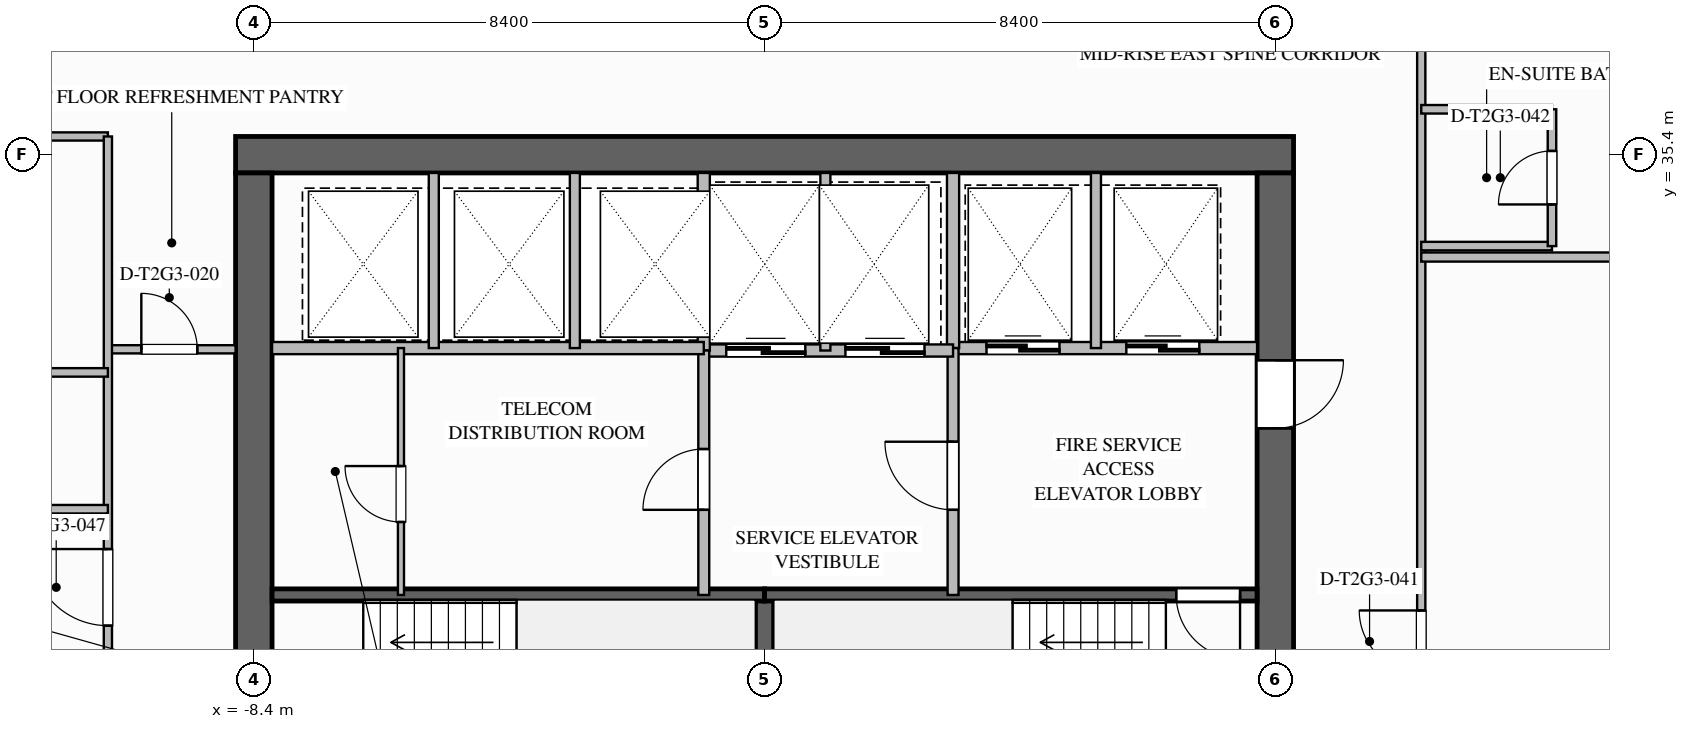
"""IFC4 building model, lengths in metres.
Left out: names, types, materials, properties, quantities, classifications, styles, units other than length and angle.
Written with IfcOpenShell. Run it as: python <this file> out.ifc"""

import sys

from ifc_helpers import new_model, si_unit, direction, frame, frame_2d, origin, place, context, subcontext, project, spatial, rectangle, extrude, element, fill, save


model = new_model("IFC4")
c1 = context("Model", 3, precision=1e-05, world=origin(), true_north=direction((0.0, 1.0)))
c2 = subcontext(c1, "Body", "Model", "MODEL_VIEW")
j1 = project(units=[si_unit("LENGTHUNIT", "METRE"), si_unit("PLANEANGLEUNIT", "RADIAN")], contexts=[c1])
p1 = place(None, origin())
s1 = spatial("IfcSite", under=j1, at=p1, CompositionType="ELEMENT")
p2 = place(p1, origin())
s2 = spatial("IfcBuilding", under=s1, at=p2, CompositionType="ELEMENT")
p3 = place(p2, frame((0.0, 0.0, 119.8)))
s3 = spatial("IfcBuildingStorey", under=s2, at=p3, CompositionType="ELEMENT", Elevation=119.8)
p4 = place(p3, frame((-8.7, 35.4, 0.0), z_axis=(0.0, 0.0, 1.0), x_axis=(1.0, 0.0, 0.0)))
e1 = element("IfcWall", 1, at=p4, inside=s3, PredefinedType="SHEAR", context=c2, shape_type="SweptSolid", body=[
    extrude(rectangle(XDim=17.4, YDim=0.6, at=frame_2d((8.7, 0.0))), origin(), (0.0, 0.0, 1.0), 3.5),
])
p5 = place(p3, frame((8.4, 35.1, 0.0), z_axis=(0.0, 0.0, 1.0), x_axis=(0.0, -1.0, 0.0)))
e2 = element("IfcWall", 2, at=p5, inside=s3, PredefinedType="SHEAR", context=c2, shape_type="SweptSolid", body=[
    extrude(rectangle(XDim=16.2, YDim=0.6, at=frame_2d((8.1, 0.0))), origin(), (0.0, 0.0, 1.0), 3.5),
])
p6 = place(p5, frame((3.08, 0.0, 0.0)))
e3 = element("IfcOpeningElement", 3, at=p6, cuts=e2, PredefinedType="OPENING", context=c2, shape_type="SweptSolid", body=[
    extrude(rectangle(XDim=1.12, YDim=2.1, at=frame_2d((0.56, 1.05))), frame((0.0, 0.31, 0.0), z_axis=(0.0, -1.0, 0.0), x_axis=(1.0, 0.0, 0.0)), (0.0, 0.0, 1.0), 0.62),
])
p7 = place(p5, frame((10.62, 0.0, 0.0)))
e4 = element("IfcOpeningElement", 4, at=p7, cuts=e2, PredefinedType="OPENING", context=c2, shape_type="SweptSolid", body=[
    extrude(rectangle(XDim=1.08, YDim=2.04, at=frame_2d((0.54, 1.02))), frame((0.0, 0.31, 0.0), z_axis=(0.0, -1.0, 0.0), x_axis=(1.0, 0.0, 0.0)), (0.0, 0.0, 1.0), 0.62),
])
p8 = place(p3, frame((-8.4, 18.9, 0.0), z_axis=(0.0, 0.0, 1.0), x_axis=(0.0, 1.0, 0.0)))
e5 = element("IfcWall", 5, at=p8, inside=s3, PredefinedType="SHEAR", context=c2, shape_type="SweptSolid", body=[
    extrude(rectangle(XDim=16.2, YDim=0.6, at=frame_2d((8.1, 0.0))), origin(), (0.0, 0.0, 1.0), 3.5),
])
p9 = place(p8, frame((4.5, 0.0, 0.0)))
e6 = element("IfcOpeningElement", 6, at=p9, cuts=e5, PredefinedType="OPENING", context=c2, shape_type="SweptSolid", body=[
    extrude(rectangle(XDim=1.08, YDim=2.04, at=frame_2d((0.54, 1.02))), frame((0.0, 0.31, 0.0), z_axis=(0.0, -1.0, 0.0), x_axis=(1.0, 0.0, 0.0)), (0.0, 0.0, 1.0), 0.62),
])
p10 = place(p3, frame((0.0, 25.04, 0.0), z_axis=(0.0, 0.0, 1.0), x_axis=(0.0, 1.0, 0.0)))
e7 = element("IfcWall", 7, at=p10, inside=s3, PredefinedType="SOLIDWALL", context=c2, shape_type="SweptSolid", body=[
    extrude(rectangle(XDim=3.12, YDim=0.3, at=frame_2d((1.56, 0.0))), origin(), (0.0, 0.0, 1.0), 3.24),
])
p11 = place(p3, frame((-8.1, 28.16, 0.0), z_axis=(0.0, 0.0, 1.0), x_axis=(1.0, 0.0, 0.0)))
e8 = element("IfcWall", 8, at=p11, inside=s3, PredefinedType="SOLIDWALL", context=c2, shape_type="SweptSolid", body=[
    extrude(rectangle(XDim=8.1, YDim=0.2, at=frame_2d((4.05, 0.0))), origin(), (0.0, 0.0, 1.0), 3.24),
])
p12 = place(p3, frame((8.1, 28.16, 0.0), z_axis=(0.0, 0.0, 1.0), x_axis=(-1.0, 0.0, 0.0)))
e9 = element("IfcWall", 9, at=p12, inside=s3, PredefinedType="SOLIDWALL", context=c2, shape_type="SweptSolid", body=[
    extrude(rectangle(XDim=8.1, YDim=0.2, at=frame_2d((4.05, 0.0))), origin(), (0.0, 0.0, 1.0), 3.24),
])
p13 = place(p12, frame((0.28, 0.0, 0.0)))
e10 = element("IfcOpeningElement", 10, at=p13, cuts=e9, PredefinedType="OPENING", context=c2, shape_type="SweptSolid", body=[
    extrude(rectangle(XDim=1.05, YDim=2.1, at=frame_2d((0.525, 1.05))), frame((0.0, 0.11, 0.0), z_axis=(0.0, -1.0, 0.0), x_axis=(1.0, 0.0, 0.0)), (0.0, 0.0, 1.0), 0.22),
])
p14 = place(p3, frame((3.1, 32.22, 0.0), z_axis=(0.0, 0.0, 1.0), x_axis=(1.0, 0.0, 0.0)))
e11 = element("IfcWall", 11, at=p14, inside=s3, PredefinedType="SOLIDWALL", context=c2, shape_type="SweptSolid", body=[
    extrude(rectangle(XDim=5.0, YDim=0.2, at=frame_2d((2.5, 0.0))), origin(), (0.0, 0.0, 1.0), 3.24),
])
p15 = place(p14, frame((0.55, 0.0, 0.0)))
e12 = element("IfcOpeningElement", 12, at=p15, cuts=e11, PredefinedType="OPENING", context=c2, shape_type="SweptSolid", body=[
    extrude(rectangle(XDim=1.2, YDim=2.2, at=frame_2d((0.6, 1.1))), frame((0.0, 0.11, 0.0), z_axis=(0.0, -1.0, 0.0), x_axis=(1.0, 0.0, 0.0)), (0.0, 0.0, 1.0), 0.22),
])
p16 = place(p14, frame((2.85, 0.0, 0.0)))
e13 = element("IfcOpeningElement", 13, at=p16, cuts=e11, PredefinedType="OPENING", context=c2, shape_type="SweptSolid", body=[
    extrude(rectangle(XDim=1.2, YDim=2.2, at=frame_2d((0.6, 1.1))), frame((0.0, 0.11, 0.0), z_axis=(0.0, -1.0, 0.0), x_axis=(1.0, 0.0, 0.0)), (0.0, 0.0, 1.0), 0.22),
])
p17 = place(p3, frame((3.1, 32.22, 0.0), z_axis=(0.0, 0.0, 1.0), x_axis=(0.0, 1.0, 0.0)))
e14 = element("IfcWall", 14, at=p17, inside=s3, PredefinedType="SOLIDWALL", context=c2, shape_type="SweptSolid", body=[
    extrude(rectangle(XDim=2.88, YDim=0.2, at=frame_2d((1.44, 0.0))), origin(), (0.0, 0.0, 1.0), 3.24),
])
p18 = place(p3, frame((5.45, 32.22, 0.0), z_axis=(0.0, 0.0, 1.0), x_axis=(0.0, 1.0, 0.0)))
e15 = element("IfcWall", 15, at=p18, inside=s3, PredefinedType="PARTITIONING", context=c2, shape_type="SweptSolid", body=[
    extrude(rectangle(XDim=2.88, YDim=0.165, at=frame_2d((1.44, 0.0))), origin(), (0.0, 0.0, 1.0), 3.24),
])
p19 = place(p3, frame((3.1, 28.16, 0.0), z_axis=(0.0, 0.0, 1.0), x_axis=(0.0, 1.0, 0.0)))
e16 = element("IfcWall", 16, at=p19, inside=s3, PredefinedType="SOLIDWALL", context=c2, shape_type="SweptSolid", body=[
    extrude(rectangle(XDim=4.06, YDim=0.18, at=frame_2d((2.03, 0.0))), origin(), (0.0, 0.0, 1.0), 3.24),
])
p20 = place(p19, frame((1.4, 0.0, 0.0)))
e17 = element("IfcOpeningElement", 17, at=p20, cuts=e16, PredefinedType="OPENING", context=c2, shape_type="SweptSolid", body=[
    extrude(rectangle(XDim=1.12, YDim=2.1, at=frame_2d((0.56, 1.05))), frame((0.0, 0.1, 0.0), z_axis=(0.0, -1.0, 0.0), x_axis=(1.0, 0.0, 0.0)), (0.0, 0.0, 1.0), 0.2),
])
p21 = place(p3, frame((-1.0, 32.18, 0.0), z_axis=(0.0, 0.0, 1.0), x_axis=(1.0, 0.0, 0.0)))
e18 = element("IfcWall", 18, at=p21, inside=s3, PredefinedType="SOLIDWALL", context=c2, shape_type="SweptSolid", body=[
    extrude(rectangle(XDim=4.1, YDim=0.2, at=frame_2d((2.05, 0.0))), origin(), (0.0, 0.0, 1.0), 3.24),
])
p22 = place(p21, frame((0.37, 0.0, 0.0)))
e19 = element("IfcOpeningElement", 19, at=p22, cuts=e18, PredefinedType="OPENING", context=c2, shape_type="SweptSolid", body=[
    extrude(rectangle(XDim=1.3, YDim=2.2, at=frame_2d((0.65, 1.1))), frame((0.0, 0.11, 0.0), z_axis=(0.0, -1.0, 0.0), x_axis=(1.0, 0.0, 0.0)), (0.0, 0.0, 1.0), 0.22),
])
p23 = place(p21, frame((2.33, 0.0, 0.0)))
e20 = element("IfcOpeningElement", 20, at=p23, cuts=e18, PredefinedType="OPENING", context=c2, shape_type="SweptSolid", body=[
    extrude(rectangle(XDim=1.3, YDim=2.2, at=frame_2d((0.65, 1.1))), frame((0.0, 0.11, 0.0), z_axis=(0.0, -1.0, 0.0), x_axis=(1.0, 0.0, 0.0)), (0.0, 0.0, 1.0), 0.22),
])
p24 = place(p3, frame((-1.0, 32.18, 0.0), z_axis=(0.0, 0.0, 1.0), x_axis=(0.0, 1.0, 0.0)))
e21 = element("IfcWall", 21, at=p24, inside=s3, PredefinedType="SOLIDWALL", context=c2, shape_type="SweptSolid", body=[
    extrude(rectangle(XDim=2.92, YDim=0.2, at=frame_2d((1.46, 0.0))), origin(), (0.0, 0.0, 1.0), 3.24),
])
p25 = place(p3, frame((1.0, 32.18, 0.0), z_axis=(0.0, 0.0, 1.0), x_axis=(0.0, 1.0, 0.0)))
e22 = element("IfcWall", 22, at=p25, inside=s3, PredefinedType="PARTITIONING", context=c2, shape_type="SweptSolid", body=[
    extrude(rectangle(XDim=2.92, YDim=0.165, at=frame_2d((1.46, 0.0))), origin(), (0.0, 0.0, 1.0), 3.24),
])
p26 = place(p3, frame((-1.0, 28.16, 0.0), z_axis=(0.0, 0.0, 1.0), x_axis=(0.0, 1.0, 0.0)))
e23 = element("IfcWall", 23, at=p26, inside=s3, PredefinedType="SOLIDWALL", context=c2, shape_type="SweptSolid", body=[
    extrude(rectangle(XDim=4.02, YDim=0.18, at=frame_2d((2.01, 0.0))), origin(), (0.0, 0.0, 1.0), 3.24),
])
p27 = place(p26, frame((1.4, 0.0, 0.0)))
e24 = element("IfcOpeningElement", 24, at=p27, cuts=e23, PredefinedType="OPENING", context=c2, shape_type="SweptSolid", body=[
    extrude(rectangle(XDim=1.0, YDim=2.1, at=frame_2d((0.5, 1.05))), frame((0.0, 0.1, 0.0), z_axis=(0.0, -1.0, 0.0), x_axis=(1.0, 0.0, 0.0)), (0.0, 0.0, 1.0), 0.2),
])
p28 = place(p3, frame((-8.1, 32.22, 0.0), z_axis=(0.0, 0.0, 1.0), x_axis=(1.0, 0.0, 0.0)))
e25 = element("IfcWall", 25, at=p28, inside=s3, PredefinedType="SOLIDWALL", context=c2, shape_type="SweptSolid", body=[
    extrude(rectangle(XDim=7.1, YDim=0.2, at=frame_2d((3.55, 0.0))), origin(), (0.0, 0.0, 1.0), 3.24),
])
for number, where, z_axis, x_axis in (
    (26, (-5.44, 32.22, 0.0), (0.0, 0.0, 1.0), (0.0, 1.0, 0.0)),
    (27, (-3.12, 32.22, 0.0), (0.0, 0.0, 1.0), (0.0, 1.0, 0.0)),
):
    element("IfcWall", number, at=place(p3, frame(where, z_axis=z_axis, x_axis=x_axis)), inside=s3, PredefinedType="PARTITIONING", context=c2, shape_type="SweptSolid", body=[
        extrude(rectangle(XDim=2.88, YDim=0.165, at=frame_2d((1.44, 0.0))), origin(), (0.0, 0.0, 1.0), 3.24),
    ])
p29 = place(p3, frame((-5.98, 28.16, 0.0), z_axis=(0.0, 0.0, 1.0), x_axis=(0.0, 1.0, 0.0)))
e28 = element("IfcWall", 28, at=p29, inside=s3, PredefinedType="PARTITIONING", context=c2, shape_type="SweptSolid", body=[
    extrude(rectangle(XDim=4.06, YDim=0.1, at=frame_2d((2.03, 0.0))), origin(), (0.0, 0.0, 1.0), 3.24),
])
p30 = place(p29, frame((1.2, 0.0, 0.0)))
e29 = element("IfcOpeningElement", 29, at=p30, cuts=e28, PredefinedType="OPENING", context=c2, shape_type="SweptSolid", body=[
    extrude(rectangle(XDim=0.92, YDim=2.1, at=frame_2d((0.46, 1.05))), frame((0.0, 0.06, 0.0), z_axis=(0.0, -1.0, 0.0), x_axis=(1.0, 0.0, 0.0)), (0.0, 0.0, 1.0), 0.12),
])
p31 = place(p3, frame((-10.8, 32.2, 0.0), z_axis=(0.0, 0.0, 1.0), x_axis=(1.0, 0.0, 0.0)))
e30 = element("IfcWall", 30, at=p31, inside=s3, PredefinedType="PARTITIONING", context=c2, shape_type="SweptSolid", body=[
    extrude(rectangle(XDim=2.1, YDim=0.135, at=frame_2d((1.05, 0.0))), origin(), (0.0, 0.0, 1.0), 3.24),
])
p32 = place(p31, frame((0.55, 0.0, 0.0)))
e31 = element("IfcOpeningElement", 31, at=p32, cuts=e30, PredefinedType="OPENING", context=c2, shape_type="SweptSolid", body=[
    extrude(rectangle(XDim=0.92, YDim=2.1, at=frame_2d((0.46, 1.05))), frame((0.0, 0.077, 0.0), z_axis=(0.0, -1.0, 0.0), x_axis=(1.0, 0.0, 0.0)), (0.0, 0.0, 1.0), 0.155),
])
p33 = place(p3, frame((-16.2, 35.7, 0.0), z_axis=(0.0, 0.0, 1.0), x_axis=(1.0, 0.0, 0.0)))
e32 = element("IfcWall", 32, at=p33, inside=s3, PredefinedType="PARTITIONING", context=c2, shape_type="SweptSolid", body=[
    extrude(rectangle(XDim=5.4, YDim=0.135, at=frame_2d((2.7, 0.0))), origin(), (0.0, 0.0, 1.0), 3.24),
])
p34 = place(p3, frame((-10.8, 18.3, 0.0), z_axis=(0.0, 0.0, 1.0), x_axis=(0.0, 1.0, 0.0)))
e33 = element("IfcWall", 33, at=p34, inside=s3, PredefinedType="PARTITIONING", context=c2, shape_type="SweptSolid", body=[
    extrude(rectangle(XDim=17.4, YDim=0.135, at=frame_2d((8.7, 0.0))), origin(), (0.0, 0.0, 1.0), 3.24),
])
p35 = place(p34, frame((6.785, 0.0, 0.0)))
e34 = element("IfcOpeningElement", 34, at=p35, cuts=e33, PredefinedType="OPENING", context=c2, shape_type="SweptSolid", body=[
    extrude(rectangle(XDim=1.26, YDim=2.2, at=frame_2d((0.63, 1.1))), frame((0.0, 0.077, 0.0), z_axis=(0.0, -1.0, 0.0), x_axis=(1.0, 0.0, 0.0)), (0.0, 0.0, 1.0), 0.155),
])
p36 = place(p34, frame((9.355, 0.0, 0.0)))
e35 = element("IfcOpeningElement", 35, at=p36, cuts=e33, PredefinedType="OPENING", context=c2, shape_type="SweptSolid", body=[
    extrude(rectangle(XDim=1.26, YDim=2.2, at=frame_2d((0.63, 1.1))), frame((0.0, 0.077, 0.0), z_axis=(0.0, -1.0, 0.0), x_axis=(1.0, 0.0, 0.0)), (0.0, 0.0, 1.0), 0.155),
])
p37 = place(p3, frame((10.8, 10.8, 0.0), z_axis=(0.0, 0.0, 1.0), x_axis=(0.0, 1.0, 0.0)))
e36 = element("IfcWall", 36, at=p37, inside=s3, PredefinedType="PARTITIONING", context=c2, shape_type="SweptSolid", body=[
    extrude(rectangle(XDim=32.4, YDim=0.135, at=frame_2d((16.2, 0.0))), origin(), (0.0, 0.0, 1.0), 3.24),
])
p38 = place(p37, frame((5.722, 0.0, 0.0)))
e37 = element("IfcOpeningElement", 37, at=p38, cuts=e36, PredefinedType="OPENING", context=c2, shape_type="SweptSolid", body=[
    extrude(rectangle(XDim=1.26, YDim=2.2, at=frame_2d((0.63, 1.1))), frame((0.0, 0.077, 0.0), z_axis=(0.0, -1.0, 0.0), x_axis=(1.0, 0.0, 0.0)), (0.0, 0.0, 1.0), 0.155),
])
p39 = place(p37, frame((16.085, 0.0, 0.0)))
e38 = element("IfcOpeningElement", 38, at=p39, cuts=e36, PredefinedType="OPENING", context=c2, shape_type="SweptSolid", body=[
    extrude(rectangle(XDim=1.02, YDim=2.15, at=frame_2d((0.51, 1.075))), frame((0.0, 0.077, 0.0), z_axis=(0.0, -1.0, 0.0), x_axis=(1.0, 0.0, 0.0)), (0.0, 0.0, 1.0), 0.155),
])
p40 = place(p37, frame((28.244, 0.0, 0.0)))
e39 = element("IfcOpeningElement", 39, at=p40, cuts=e36, PredefinedType="OPENING", context=c2, shape_type="SweptSolid", body=[
    extrude(rectangle(XDim=1.26, YDim=2.2, at=frame_2d((0.63, 1.1))), frame((0.0, 0.077, 0.0), z_axis=(0.0, -1.0, 0.0), x_axis=(1.0, 0.0, 0.0)), (0.0, 0.0, 1.0), 0.155),
])
p41 = place(p3, frame((10.8, 33.717, 0.0), z_axis=(0.0, 0.0, 1.0), x_axis=(1.0, 0.0, 0.0)))
e40 = element("IfcWall", 40, at=p41, inside=s3, PredefinedType="PARTITIONING", context=c2, shape_type="SweptSolid", body=[
    extrude(rectangle(XDim=11.28, YDim=0.15, at=frame_2d((5.64, 0.0))), origin(), (0.0, 0.0, 1.0), 3.24),
])
for number, where, z_axis, x_axis in (
    (41, (10.8, 33.897, 0.0), (0.0, 0.0, 1.0), (1.0, 0.0, 0.0)),
    (42, (10.8, 36.147, 0.0), (0.0, 0.0, 1.0), (1.0, 0.0, 0.0)),
):
    element("IfcWall", number, at=place(p3, frame(where, z_axis=z_axis, x_axis=x_axis)), inside=s3, PredefinedType="PLUMBINGWALL", context=c2, shape_type="SweptSolid", body=[
        extrude(rectangle(XDim=2.15, YDim=0.14, at=frame_2d((1.075, 0.0))), origin(), (0.0, 0.0, 1.0), 3.24),
    ])
p42 = place(p3, frame((12.95, 33.897, 0.0), z_axis=(0.0, 0.0, 1.0), x_axis=(0.0, 1.0, 0.0)))
e43 = element("IfcWall", 43, at=p42, inside=s3, PredefinedType="PLUMBINGWALL", context=c2, shape_type="SweptSolid", body=[
    extrude(rectangle(XDim=2.25, YDim=0.14, at=frame_2d((1.125, 0.0))), origin(), (0.0, 0.0, 1.0), 3.24),
])
p43 = place(p42, frame((0.685, 0.0, 0.0)))
e44 = element("IfcOpeningElement", 44, at=p43, cuts=e43, PredefinedType="OPENING", context=c2, shape_type="SweptSolid", body=[
    extrude(rectangle(XDim=0.88, YDim=2.1, at=frame_2d((0.44, 1.05))), frame((0.0, 0.08, 0.0), z_axis=(0.0, -1.0, 0.0), x_axis=(1.0, 0.0, 0.0)), (0.0, 0.0, 1.0), 0.16),
])
for number, where, z_axis, x_axis in (
    (45, (-10.8, 29.57, 0.0), (0.0, 0.0, 1.0), (-1.0, 0.0, 0.0)),
    (46, (-10.8, 31.82, 0.0), (0.0, 0.0, 1.0), (-1.0, 0.0, 0.0)),
):
    element("IfcWall", number, at=place(p3, frame(where, z_axis=z_axis, x_axis=x_axis)), inside=s3, PredefinedType="PLUMBINGWALL", context=c2, shape_type="SweptSolid", body=[
        extrude(rectangle(XDim=2.15, YDim=0.14, at=frame_2d((1.075, 0.0))), origin(), (0.0, 0.0, 1.0), 3.24),
    ])
p44 = place(p13, origin())
e47 = element("IfcDoor", 47, at=p44, inside=s3, OperationType="SINGLE_SWING_LEFT", PredefinedType="DOOR", context=c2, shape_type="SweptSolid", body=[
    extrude(rectangle(XDim=1.05, YDim=2.1, at=frame_2d((0.525, 1.05))), frame((0.0, 0.025, 0.0), z_axis=(0.0, -1.0, 0.0), x_axis=(1.0, 0.0, 0.0)), (0.0, 0.0, 1.0), 0.05),
])
fill(e10, e47)
p45 = place(p15, origin())
e48 = element("IfcDoor", 48, at=p45, inside=s3, OperationType="SLIDING_TO_LEFT", PredefinedType="DOOR", context=c2, shape_type="SweptSolid", body=[
    extrude(rectangle(XDim=1.2, YDim=2.2, at=frame_2d((0.6, 1.1))), frame((0.0, 0.025, 0.0), z_axis=(0.0, -1.0, 0.0), x_axis=(1.0, 0.0, 0.0)), (0.0, 0.0, 1.0), 0.05),
])
fill(e12, e48)
p46 = place(p16, origin())
e49 = element("IfcDoor", 49, at=p46, inside=s3, OperationType="SLIDING_TO_LEFT", PredefinedType="DOOR", context=c2, shape_type="SweptSolid", body=[
    extrude(rectangle(XDim=1.2, YDim=2.2, at=frame_2d((0.6, 1.1))), frame((0.0, 0.025, 0.0), z_axis=(0.0, -1.0, 0.0), x_axis=(1.0, 0.0, 0.0)), (0.0, 0.0, 1.0), 0.05),
])
fill(e13, e49)
p47 = place(p20, origin())
e50 = element("IfcDoor", 50, at=p47, inside=s3, OperationType="SINGLE_SWING_RIGHT", PredefinedType="DOOR", context=c2, shape_type="SweptSolid", body=[
    extrude(rectangle(XDim=1.12, YDim=2.1, at=frame_2d((0.56, 1.05))), frame((0.0, 0.025, 0.0), z_axis=(0.0, -1.0, 0.0), x_axis=(1.0, 0.0, 0.0)), (0.0, 0.0, 1.0), 0.05),
])
fill(e17, e50)
p48 = place(p6, origin())
e51 = element("IfcDoor", 51, at=p48, inside=s3, OperationType="SINGLE_SWING_LEFT", PredefinedType="DOOR", context=c2, shape_type="SweptSolid", body=[
    extrude(rectangle(XDim=1.12, YDim=2.1, at=frame_2d((0.56, 1.05))), frame((0.0, 0.025, 0.0), z_axis=(0.0, -1.0, 0.0), x_axis=(1.0, 0.0, 0.0)), (0.0, 0.0, 1.0), 0.05),
])
fill(e3, e51)
p49 = place(p22, origin())
e52 = element("IfcDoor", 52, at=p49, inside=s3, OperationType="SLIDING_TO_LEFT", PredefinedType="DOOR", context=c2, shape_type="SweptSolid", body=[
    extrude(rectangle(XDim=1.3, YDim=2.2, at=frame_2d((0.65, 1.1))), frame((0.0, 0.025, 0.0), z_axis=(0.0, -1.0, 0.0), x_axis=(1.0, 0.0, 0.0)), (0.0, 0.0, 1.0), 0.05),
])
fill(e19, e52)
p50 = place(p23, origin())
e53 = element("IfcDoor", 53, at=p50, inside=s3, OperationType="SLIDING_TO_LEFT", PredefinedType="DOOR", context=c2, shape_type="SweptSolid", body=[
    extrude(rectangle(XDim=1.3, YDim=2.2, at=frame_2d((0.65, 1.1))), frame((0.0, 0.025, 0.0), z_axis=(0.0, -1.0, 0.0), x_axis=(1.0, 0.0, 0.0)), (0.0, 0.0, 1.0), 0.05),
])
fill(e20, e53)
p51 = place(p27, origin())
e54 = element("IfcDoor", 54, at=p51, inside=s3, OperationType="SINGLE_SWING_LEFT", PredefinedType="DOOR", context=c2, shape_type="SweptSolid", body=[
    extrude(rectangle(XDim=1.0, YDim=2.1, at=frame_2d((0.5, 1.05))), frame((0.0, 0.025, 0.0), z_axis=(0.0, -1.0, 0.0), x_axis=(1.0, 0.0, 0.0)), (0.0, 0.0, 1.0), 0.05),
])
fill(e24, e54)
p52 = place(p30, origin())
e55 = element("IfcDoor", 55, at=p52, inside=s3, OperationType="SINGLE_SWING_RIGHT", PredefinedType="DOOR", context=c2, shape_type="SweptSolid", body=[
    extrude(rectangle(XDim=0.92, YDim=2.1, at=frame_2d((0.46, 1.05))), frame((0.0, 0.025, 0.0), z_axis=(0.0, -1.0, 0.0), x_axis=(1.0, 0.0, 0.0)), (0.0, 0.0, 1.0), 0.05),
])
fill(e29, e55)
p53 = place(p32, origin())
e56 = element("IfcDoor", 56, at=p53, inside=s3, OperationType="SINGLE_SWING_LEFT", PredefinedType="DOOR", context=c2, shape_type="SweptSolid", body=[
    extrude(rectangle(XDim=0.92, YDim=2.1, at=frame_2d((0.46, 1.05))), frame((0.0, 0.025, 0.0), z_axis=(0.0, -1.0, 0.0), x_axis=(1.0, 0.0, 0.0)), (0.0, 0.0, 1.0), 0.05),
])
fill(e31, e56)
p54 = place(p39, origin())
e57 = element("IfcDoor", 57, at=p54, inside=s3, OperationType="SINGLE_SWING_RIGHT", PredefinedType="DOOR", context=c2, shape_type="SweptSolid", body=[
    extrude(rectangle(XDim=1.02, YDim=2.15, at=frame_2d((0.51, 1.075))), frame((0.0, 0.025, 0.0), z_axis=(0.0, -1.0, 0.0), x_axis=(1.0, 0.0, 0.0)), (0.0, 0.0, 1.0), 0.05),
])
fill(e38, e57)
p55 = place(p43, origin())
e58 = element("IfcDoor", 58, at=p55, inside=s3, OperationType="SINGLE_SWING_LEFT", PredefinedType="DOOR", context=c2, shape_type="SweptSolid", body=[
    extrude(rectangle(XDim=0.88, YDim=2.1, at=frame_2d((0.44, 1.05))), frame((0.0, 0.025, 0.0), z_axis=(0.0, -1.0, 0.0), x_axis=(1.0, 0.0, 0.0)), (0.0, 0.0, 1.0), 0.05),
])
fill(e44, e58)
p56 = place(p36, origin())
e59 = element("IfcDoor", 59, at=p56, inside=s3, OperationType="SINGLE_SWING_RIGHT", PredefinedType="DOOR", context=c2, shape_type="SweptSolid", body=[
    extrude(rectangle(XDim=1.26, YDim=2.2, at=frame_2d((0.63, 1.1))), frame((0.0, 0.025, 0.0), z_axis=(0.0, -1.0, 0.0), x_axis=(1.0, 0.0, 0.0)), (0.0, 0.0, 1.0), 0.05),
])
fill(e35, e59)
save(model, sys.argv[1])
